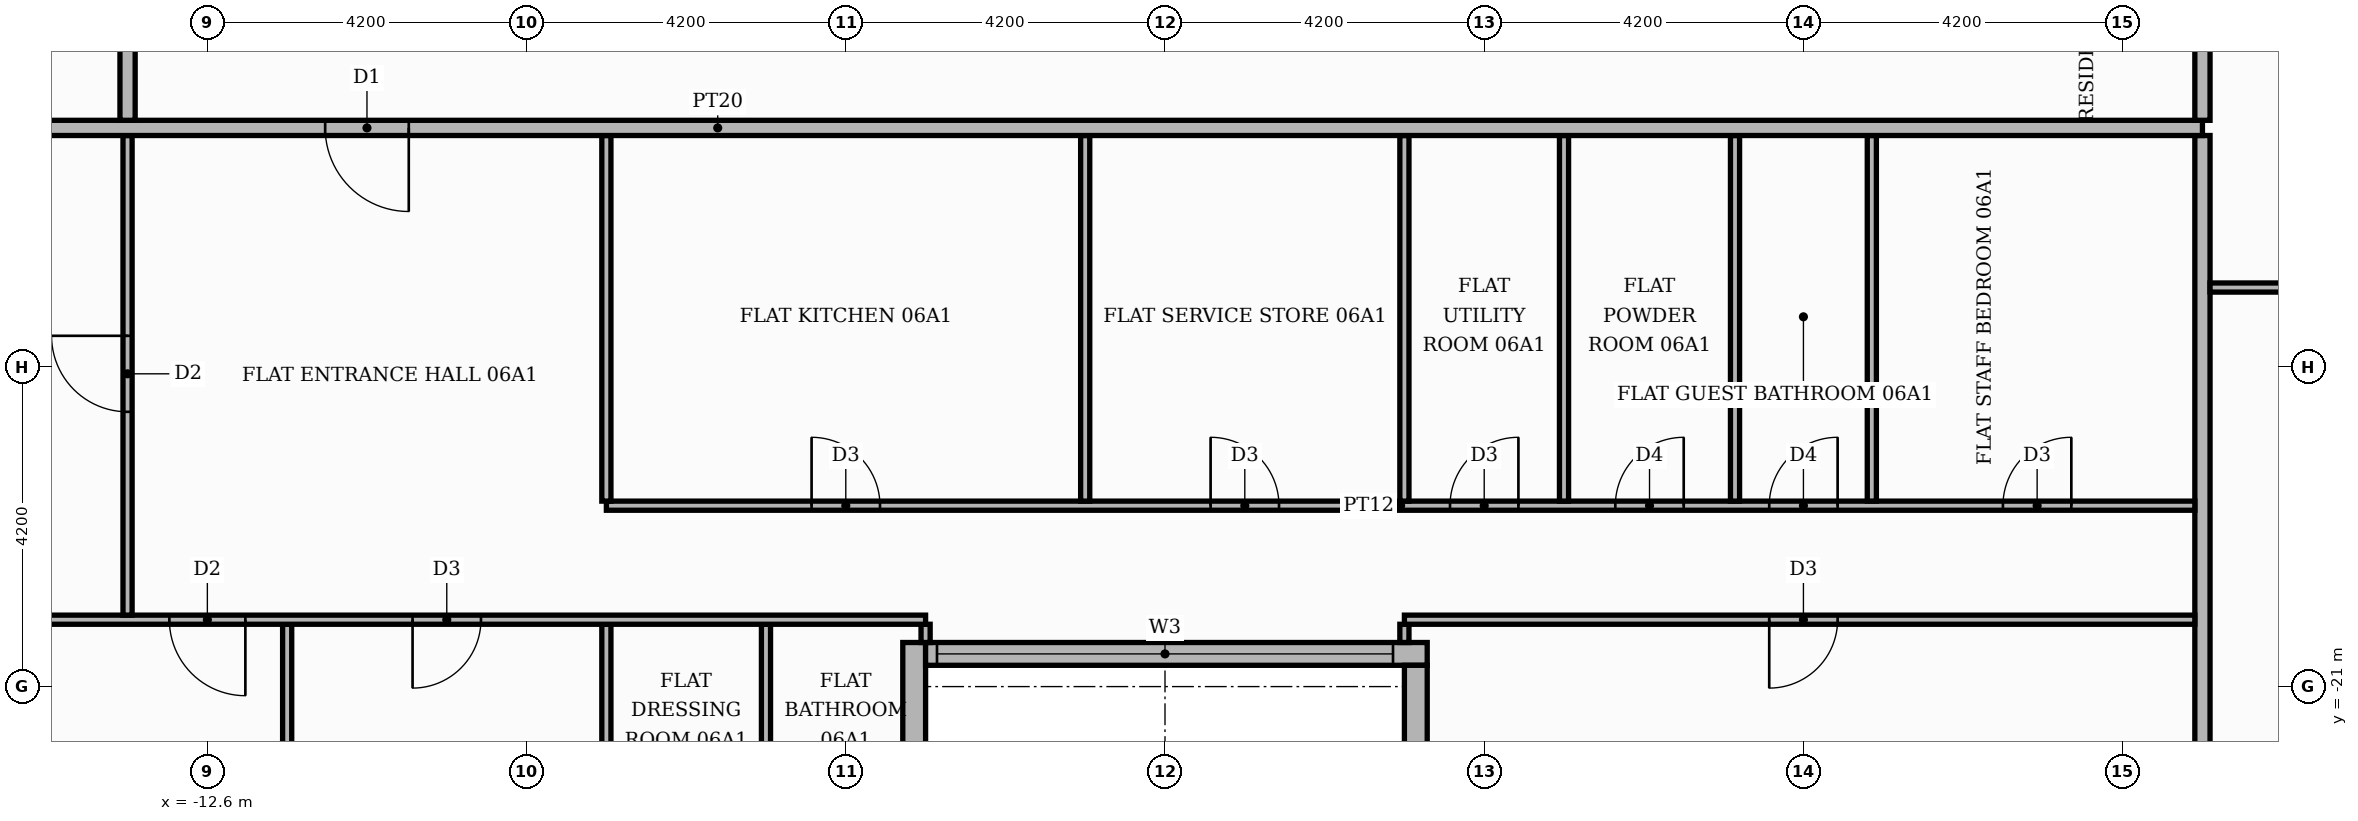
"""IFC4 building model, lengths in metres.
Left out: names, types, materials, properties, quantities, classifications, styles, units other than length and angle.
Written with IfcOpenShell. Run it as: python <this file> out.ifc"""

import sys

from ifc_helpers import new_model, si_unit, direction, frame, frame_2d, origin, place, context, subcontext, project, spatial, rectangle, extrude, element, fill, save


model = new_model("IFC4")
c1 = context("Model", 3, precision=1e-05, world=origin(), true_north=direction((0.0, 1.0)))
c2 = subcontext(c1, "Body", "Model", "MODEL_VIEW")
j1 = project(units=[si_unit("LENGTHUNIT", "METRE"), si_unit("PLANEANGLEUNIT", "RADIAN")], contexts=[c1])
p1 = place(None, origin())
s1 = spatial("IfcSite", under=j1, at=p1, CompositionType="ELEMENT")
p2 = place(p1, origin())
s2 = spatial("IfcBuilding", under=s1, at=p2, CompositionType="ELEMENT")
p3 = place(p2, frame((0.0, 0.0, 30.9)))
s3 = spatial("IfcBuildingStorey", under=s2, at=p3, CompositionType="ELEMENT", Elevation=30.9)
p4 = place(p3, frame((-3.3, -25.42, 0.0), z_axis=(0.0, 0.0, 1.0), x_axis=(0.0, 1.0, 0.0)))
e1 = element("IfcWall", 1, at=p4, inside=s3, PredefinedType="STANDARD", context=c2, shape_type="SweptSolid", body=[
    extrude(rectangle(XDim=5.0, YDim=0.3, at=frame_2d((2.5, 0.0))), origin(), (0.0, 0.0, 1.0), 3.48),
])
p5 = place(p4, frame((1.42, 0.0, 0.9)))
e2 = element("IfcOpeningElement", 2, at=p5, cuts=e1, PredefinedType="OPENING", context=c2, shape_type="SweptSolid", body=[
    extrude(rectangle(XDim=1.8, YDim=2.1, at=frame_2d((0.9, 1.05))), frame((0.0, 0.16, 0.0), z_axis=(0.0, -1.0, 0.0), x_axis=(1.0, 0.0, 0.0)), (0.0, 0.0, 1.0), 0.32),
])
p6 = place(p3, frame((-3.15, -20.57, 0.0), z_axis=(0.0, 0.0, 1.0), x_axis=(1.0, 0.0, 0.0)))
e3 = element("IfcWall", 3, at=p6, inside=s3, PredefinedType="STANDARD", context=c2, shape_type="SweptSolid", body=[
    extrude(rectangle(XDim=6.6, YDim=0.3, at=frame_2d((3.3, 0.0))), origin(), (0.0, 0.0, 1.0), 3.48),
])
p7 = place(p6, frame((0.15, 0.0, 0.9)))
e4 = element("IfcOpeningElement", 4, at=p7, cuts=e3, PredefinedType="OPENING", context=c2, shape_type="SweptSolid", body=[
    extrude(rectangle(XDim=6.0, YDim=2.1, at=frame_2d((3.0, 1.05))), frame((0.0, 0.16, 0.0), z_axis=(0.0, -1.0, 0.0), x_axis=(1.0, 0.0, 0.0)), (0.0, 0.0, 1.0), 0.32),
])
p8 = place(p3, frame((3.3, -20.72, 0.0), z_axis=(0.0, 0.0, 1.0), x_axis=(0.0, -1.0, 0.0)))
e5 = element("IfcWall", 5, at=p8, inside=s3, PredefinedType="STANDARD", context=c2, shape_type="SweptSolid", body=[
    extrude(rectangle(XDim=5.0, YDim=0.3, at=frame_2d((2.5, 0.0))), origin(), (0.0, 0.0, 1.0), 3.48),
])
p9 = place(p8, frame((1.48, 0.0, 0.9)))
e6 = element("IfcOpeningElement", 6, at=p9, cuts=e5, PredefinedType="OPENING", context=c2, shape_type="SweptSolid", body=[
    extrude(rectangle(XDim=1.8, YDim=2.1, at=frame_2d((0.9, 1.05))), frame((0.0, 0.16, 0.0), z_axis=(0.0, -1.0, 0.0), x_axis=(1.0, 0.0, 0.0)), (0.0, 0.0, 1.0), 0.32),
])
p10 = place(p3, frame((-11.55, -25.42, 0.0), z_axis=(0.0, 0.0, 1.0), x_axis=(0.0, 1.0, 0.0)))
e7 = element("IfcWall", 7, at=p10, inside=s3, PredefinedType="PARTITIONING", context=c2, shape_type="SweptSolid", body=[
    extrude(rectangle(XDim=5.24, YDim=0.12, at=frame_2d((2.62, 0.0))), origin(), (0.0, 0.0, 1.0), 3.48),
])
p11 = place(p3, frame((-7.35, -25.42, 0.0), z_axis=(0.0, 0.0, 1.0), x_axis=(0.0, 1.0, 0.0)))
e8 = element("IfcWall", 8, at=p11, inside=s3, PredefinedType="PARTITIONING", context=c2, shape_type="SweptSolid", body=[
    extrude(rectangle(XDim=5.24, YDim=0.12, at=frame_2d((2.62, 0.0))), origin(), (0.0, 0.0, 1.0), 3.48),
])
p12 = place(p11, frame((2.05, 0.0, 0.0)))
e9 = element("IfcOpeningElement", 9, at=p12, cuts=e8, PredefinedType="OPENING", context=c2, shape_type="SweptSolid", body=[
    extrude(rectangle(XDim=0.9, YDim=2.1, at=frame_2d((0.45, 1.05))), frame((0.0, 0.07, 0.0), z_axis=(0.0, -1.0, 0.0), x_axis=(1.0, 0.0, 0.0)), (0.0, 0.0, 1.0), 0.14),
])
p13 = place(p3, frame((-5.25, -25.42, 0.0), z_axis=(0.0, 0.0, 1.0), x_axis=(0.0, 1.0, 0.0)))
e10 = element("IfcWall", 10, at=p13, inside=s3, PredefinedType="PARTITIONING", context=c2, shape_type="SweptSolid", body=[
    extrude(rectangle(XDim=5.24, YDim=0.12, at=frame_2d((2.62, 0.0))), origin(), (0.0, 0.0, 1.0), 3.48),
])
p14 = place(p13, frame((2.05, 0.0, 0.0)))
e11 = element("IfcOpeningElement", 11, at=p14, cuts=e10, PredefinedType="OPENING", context=c2, shape_type="SweptSolid", body=[
    extrude(rectangle(XDim=0.9, YDim=2.1, at=frame_2d((0.45, 1.05))), frame((0.0, 0.07, 0.0), z_axis=(0.0, -1.0, 0.0), x_axis=(1.0, 0.0, 0.0)), (0.0, 0.0, 1.0), 0.14),
])
p15 = place(p3, frame((13.65, -25.42, 0.0), z_axis=(0.0, 0.0, 1.0), x_axis=(0.0, 1.0, 0.0)))
e12 = element("IfcWall", 12, at=p15, inside=s3, PredefinedType="PARTITIONING", context=c2, shape_type="SweptSolid", body=[
    extrude(rectangle(XDim=11.67, YDim=0.2, at=frame_2d((5.835, 0.0))), origin(), (0.0, 0.0, 1.0), 3.48),
])
for number, where, z_axis, x_axis in (
    (13, (-3.15, -20.42, 0.0), (0.0, 0.0, 1.0), (0.0, 1.0, 0.0)),
    (14, (3.15, -20.42, 0.0), (0.0, 0.0, 1.0), (0.0, 1.0, 0.0)),
):
    element("IfcWall", number, at=place(p3, frame(where, z_axis=z_axis, x_axis=x_axis)), inside=s3, PredefinedType="PARTITIONING", context=c2, shape_type="SweptSolid", body=[
        extrude(rectangle(XDim=0.24, YDim=0.12, at=frame_2d((0.12, 0.0))), origin(), (0.0, 0.0, 1.0), 3.48),
    ])
p16 = place(p3, frame((-17.3, -20.12, 0.0), z_axis=(0.0, 0.0, 1.0), x_axis=(1.0, 0.0, 0.0)))
e15 = element("IfcWall", 15, at=p16, inside=s3, PredefinedType="PARTITIONING", context=c2, shape_type="SweptSolid", body=[
    extrude(rectangle(XDim=14.15, YDim=0.12, at=frame_2d((7.075, 0.0))), origin(), (0.0, 0.0, 1.0), 3.48),
])
p17 = place(p16, frame((4.2, 0.0, 0.0)))
e16 = element("IfcOpeningElement", 16, at=p17, cuts=e15, PredefinedType="OPENING", context=c2, shape_type="SweptSolid", body=[
    extrude(rectangle(XDim=1.0, YDim=2.1, at=frame_2d((0.5, 1.05))), frame((0.0, 0.07, 0.0), z_axis=(0.0, -1.0, 0.0), x_axis=(1.0, 0.0, 0.0)), (0.0, 0.0, 1.0), 0.14),
])
p18 = place(p16, frame((7.4, 0.0, 0.0)))
e17 = element("IfcOpeningElement", 17, at=p18, cuts=e15, PredefinedType="OPENING", context=c2, shape_type="SweptSolid", body=[
    extrude(rectangle(XDim=0.9, YDim=2.1, at=frame_2d((0.45, 1.05))), frame((0.0, 0.07, 0.0), z_axis=(0.0, -1.0, 0.0), x_axis=(1.0, 0.0, 0.0)), (0.0, 0.0, 1.0), 0.14),
])
p19 = place(p3, frame((3.15, -20.12, 0.0), z_axis=(0.0, 0.0, 1.0), x_axis=(1.0, 0.0, 0.0)))
e18 = element("IfcWall", 18, at=p19, inside=s3, PredefinedType="PARTITIONING", context=c2, shape_type="SweptSolid", body=[
    extrude(rectangle(XDim=10.4, YDim=0.12, at=frame_2d((5.2, 0.0))), origin(), (0.0, 0.0, 1.0), 3.48),
])
p20 = place(p19, frame((4.8, 0.0, 0.0)))
e19 = element("IfcOpeningElement", 19, at=p20, cuts=e18, PredefinedType="OPENING", context=c2, shape_type="SweptSolid", body=[
    extrude(rectangle(XDim=0.9, YDim=2.1, at=frame_2d((0.45, 1.05))), frame((0.0, 0.07, 0.0), z_axis=(0.0, -1.0, 0.0), x_axis=(1.0, 0.0, 0.0)), (0.0, 0.0, 1.0), 0.14),
])
p21 = place(p3, frame((-13.65, -20.06, 0.0), z_axis=(0.0, 0.0, 1.0), x_axis=(0.0, 1.0, 0.0)))
e20 = element("IfcWall", 20, at=p21, inside=s3, PredefinedType="PARTITIONING", context=c2, shape_type="SweptSolid", body=[
    extrude(rectangle(XDim=6.31, YDim=0.12, at=frame_2d((3.155, 0.0))), origin(), (0.0, 0.0, 1.0), 3.48),
])
p22 = place(p21, frame((2.675, 0.0, 0.0)))
e21 = element("IfcOpeningElement", 21, at=p22, cuts=e20, PredefinedType="OPENING", context=c2, shape_type="SweptSolid", body=[
    extrude(rectangle(XDim=1.0, YDim=2.1, at=frame_2d((0.5, 1.05))), frame((0.0, 0.07, 0.0), z_axis=(0.0, -1.0, 0.0), x_axis=(1.0, 0.0, 0.0)), (0.0, 0.0, 1.0), 0.14),
])
p23 = place(p3, frame((-7.35, -18.62, 0.0), z_axis=(0.0, 0.0, 1.0), x_axis=(1.0, 0.0, 0.0)))
e22 = element("IfcWall", 22, at=p23, inside=s3, PredefinedType="PARTITIONING", context=c2, shape_type="SweptSolid", body=[
    extrude(rectangle(XDim=20.9, YDim=0.12, at=frame_2d((10.45, 0.0))), origin(), (0.0, 0.0, 1.0), 3.48),
])
p24 = place(p23, frame((2.7, 0.0, 0.0)))
e23 = element("IfcOpeningElement", 23, at=p24, cuts=e22, PredefinedType="OPENING", context=c2, shape_type="SweptSolid", body=[
    extrude(rectangle(XDim=0.9, YDim=2.1, at=frame_2d((0.45, 1.05))), frame((0.0, 0.07, 0.0), z_axis=(0.0, -1.0, 0.0), x_axis=(1.0, 0.0, 0.0)), (0.0, 0.0, 1.0), 0.14),
])
p25 = place(p23, frame((7.95, 0.0, 0.0)))
e24 = element("IfcOpeningElement", 24, at=p25, cuts=e22, PredefinedType="OPENING", context=c2, shape_type="SweptSolid", body=[
    extrude(rectangle(XDim=0.9, YDim=2.1, at=frame_2d((0.45, 1.05))), frame((0.0, 0.07, 0.0), z_axis=(0.0, -1.0, 0.0), x_axis=(1.0, 0.0, 0.0)), (0.0, 0.0, 1.0), 0.14),
])
p26 = place(p23, frame((11.1, 0.0, 0.0)))
e25 = element("IfcOpeningElement", 25, at=p26, cuts=e22, PredefinedType="OPENING", context=c2, shape_type="SweptSolid", body=[
    extrude(rectangle(XDim=0.9, YDim=2.1, at=frame_2d((0.45, 1.05))), frame((0.0, 0.07, 0.0), z_axis=(0.0, -1.0, 0.0), x_axis=(1.0, 0.0, 0.0)), (0.0, 0.0, 1.0), 0.14),
])
p27 = place(p23, frame((13.275, 0.0, 0.0)))
e26 = element("IfcOpeningElement", 26, at=p27, cuts=e22, PredefinedType="OPENING", context=c2, shape_type="SweptSolid", body=[
    extrude(rectangle(XDim=0.9, YDim=2.1, at=frame_2d((0.45, 1.05))), frame((0.0, 0.07, 0.0), z_axis=(0.0, -1.0, 0.0), x_axis=(1.0, 0.0, 0.0)), (0.0, 0.0, 1.0), 0.14),
])
p28 = place(p23, frame((15.3, 0.0, 0.0)))
e27 = element("IfcOpeningElement", 27, at=p28, cuts=e22, PredefinedType="OPENING", context=c2, shape_type="SweptSolid", body=[
    extrude(rectangle(XDim=0.9, YDim=2.1, at=frame_2d((0.45, 1.05))), frame((0.0, 0.07, 0.0), z_axis=(0.0, -1.0, 0.0), x_axis=(1.0, 0.0, 0.0)), (0.0, 0.0, 1.0), 0.14),
])
p29 = place(p23, frame((18.375, 0.0, 0.0)))
e28 = element("IfcOpeningElement", 28, at=p29, cuts=e22, PredefinedType="OPENING", context=c2, shape_type="SweptSolid", body=[
    extrude(rectangle(XDim=0.9, YDim=2.1, at=frame_2d((0.45, 1.05))), frame((0.0, 0.07, 0.0), z_axis=(0.0, -1.0, 0.0), x_axis=(1.0, 0.0, 0.0)), (0.0, 0.0, 1.0), 0.14),
])
for number, where, z_axis, x_axis in (
    (29, (-7.35, -18.56, 0.0), (0.0, 0.0, 1.0), (0.0, 1.0, 0.0)),
    (30, (-1.05, -18.56, 0.0), (0.0, 0.0, 1.0), (0.0, 1.0, 0.0)),
    (31, (3.15, -18.56, 0.0), (0.0, 0.0, 1.0), (0.0, 1.0, 0.0)),
    (32, (5.25, -18.56, 0.0), (0.0, 0.0, 1.0), (0.0, 1.0, 0.0)),
    (33, (7.5, -18.56, 0.0), (0.0, 0.0, 1.0), (0.0, 1.0, 0.0)),
    (34, (9.3, -18.56, 0.0), (0.0, 0.0, 1.0), (0.0, 1.0, 0.0)),
):
    element("IfcWall", number, at=place(p3, frame(where, z_axis=z_axis, x_axis=x_axis)), inside=s3, PredefinedType="PARTITIONING", context=c2, shape_type="SweptSolid", body=[
        extrude(rectangle(XDim=4.81, YDim=0.12, at=frame_2d((2.405, 0.0))), origin(), (0.0, 0.0, 1.0), 3.48),
    ])
p30 = place(p3, frame((13.75, -15.75, 0.0), z_axis=(0.0, 0.0, 1.0), x_axis=(1.0, 0.0, 0.0)))
e35 = element("IfcWall", 35, at=p30, inside=s3, PredefinedType="PARTITIONING", context=c2, shape_type="SweptSolid", body=[
    extrude(rectangle(XDim=6.37, YDim=0.12, at=frame_2d((3.185, 0.0))), origin(), (0.0, 0.0, 1.0), 3.48),
])
p31 = place(p30, frame((2.635, 0.0, 0.0)))
e36 = element("IfcOpeningElement", 36, at=p31, cuts=e35, PredefinedType="OPENING", context=c2, shape_type="SweptSolid", body=[
    extrude(rectangle(XDim=1.0, YDim=2.1, at=frame_2d((0.5, 1.05))), frame((0.0, 0.07, 0.0), z_axis=(0.0, -1.0, 0.0), x_axis=(1.0, 0.0, 0.0)), (0.0, 0.0, 1.0), 0.14),
])
p32 = place(p3, frame((-25.42, -13.65, 0.0), z_axis=(0.0, 0.0, 1.0), x_axis=(1.0, 0.0, 0.0)))
e37 = element("IfcWall", 37, at=p32, inside=s3, PredefinedType="PARTITIONING", context=c2, shape_type="SweptSolid", body=[
    extrude(rectangle(XDim=39.07, YDim=0.2, at=frame_2d((19.535, 0.0))), origin(), (0.0, 0.0, 1.0), 3.48),
])
p33 = place(p32, frame((14.37, 0.0, 0.0)))
e38 = element("IfcOpeningElement", 38, at=p33, cuts=e37, PredefinedType="OPENING", context=c2, shape_type="SweptSolid", body=[
    extrude(rectangle(XDim=1.1, YDim=2.4, at=frame_2d((0.55, 1.2))), frame((0.0, 0.11, 0.0), z_axis=(0.0, -1.0, 0.0), x_axis=(1.0, 0.0, 0.0)), (0.0, 0.0, 1.0), 0.22),
])
p34 = place(p3, frame((-13.65, -13.55, 0.0), z_axis=(0.0, 0.0, 1.0), x_axis=(0.0, 1.0, 0.0)))
e39 = element("IfcWall", 39, at=p34, inside=s3, PredefinedType="PARTITIONING", context=c2, shape_type="SweptSolid", body=[
    extrude(rectangle(XDim=27.1, YDim=0.2, at=frame_2d((13.55, 0.0))), origin(), (0.0, 0.0, 1.0), 3.48),
])
p35 = place(p34, frame((24.55, 0.0, 0.0)))
e40 = element("IfcOpeningElement", 40, at=p35, cuts=e39, PredefinedType="OPENING", context=c2, shape_type="SweptSolid", body=[
    extrude(rectangle(XDim=1.1, YDim=2.4, at=frame_2d((0.55, 1.2))), frame((0.0, 0.11, 0.0), z_axis=(0.0, -1.0, 0.0), x_axis=(1.0, 0.0, 0.0)), (0.0, 0.0, 1.0), 0.22),
])
p36 = place(p3, frame((13.65, -13.55, 0.0), z_axis=(0.0, 0.0, 1.0), x_axis=(0.0, 1.0, 0.0)))
e41 = element("IfcWall", 41, at=p36, inside=s3, PredefinedType="PARTITIONING", context=c2, shape_type="SweptSolid", body=[
    extrude(rectangle(XDim=8.2, YDim=0.2, at=frame_2d((4.1, 0.0))), origin(), (0.0, 0.0, 1.0), 3.48),
])
p37 = place(p36, frame((1.45, 0.0, 0.0)))
e42 = element("IfcOpeningElement", 42, at=p37, cuts=e41, PredefinedType="OPENING", context=c2, shape_type="SweptSolid", body=[
    extrude(rectangle(XDim=1.1, YDim=2.4, at=frame_2d((0.55, 1.2))), frame((0.0, 0.11, 0.0), z_axis=(0.0, -1.0, 0.0), x_axis=(1.0, 0.0, 0.0)), (0.0, 0.0, 1.0), 0.22),
])
p38 = place(p7, origin())
e43 = element("IfcWindow", 43, at=p38, inside=s3, PartitioningType="SINGLE_PANEL", PredefinedType="WINDOW", context=c2, shape_type="SweptSolid", body=[
    extrude(rectangle(XDim=6.0, YDim=2.1, at=frame_2d((3.0, 1.05))), frame((0.0, 0.03, 0.0), z_axis=(0.0, -1.0, 0.0), x_axis=(1.0, 0.0, 0.0)), (0.0, 0.0, 1.0), 0.06),
])
fill(e4, e43)
p39 = place(p33, frame((1.1, 0.0, 0.0), z_axis=(0.0, 0.0, 1.0), x_axis=(-1.0, 0.0, 0.0)))
e44 = element("IfcDoor", 44, at=p39, inside=s3, OperationType="SINGLE_SWING_RIGHT", PredefinedType="DOOR", context=c2, shape_type="SweptSolid", body=[
    extrude(rectangle(XDim=1.1, YDim=2.4, at=frame_2d((0.55, 1.2))), frame((0.0, 0.025, 0.0), z_axis=(0.0, -1.0, 0.0), x_axis=(1.0, 0.0, 0.0)), (0.0, 0.0, 1.0), 0.05),
])
fill(e38, e44)
p40 = place(p22, origin())
e45 = element("IfcDoor", 45, at=p40, inside=s3, OperationType="SINGLE_SWING_RIGHT", PredefinedType="DOOR", context=c2, shape_type="SweptSolid", body=[
    extrude(rectangle(XDim=1.0, YDim=2.1, at=frame_2d((0.5, 1.05))), frame((0.0, 0.025, 0.0), z_axis=(0.0, -1.0, 0.0), x_axis=(1.0, 0.0, 0.0)), (0.0, 0.0, 1.0), 0.05),
])
fill(e21, e45)
p41 = place(p24, origin())
e46 = element("IfcDoor", 46, at=p41, inside=s3, OperationType="SINGLE_SWING_LEFT", PredefinedType="DOOR", context=c2, shape_type="SweptSolid", body=[
    extrude(rectangle(XDim=0.9, YDim=2.1, at=frame_2d((0.45, 1.05))), frame((0.0, 0.025, 0.0), z_axis=(0.0, -1.0, 0.0), x_axis=(1.0, 0.0, 0.0)), (0.0, 0.0, 1.0), 0.05),
])
fill(e23, e46)
p42 = place(p25, origin())
e47 = element("IfcDoor", 47, at=p42, inside=s3, OperationType="SINGLE_SWING_LEFT", PredefinedType="DOOR", context=c2, shape_type="SweptSolid", body=[
    extrude(rectangle(XDim=0.9, YDim=2.1, at=frame_2d((0.45, 1.05))), frame((0.0, 0.025, 0.0), z_axis=(0.0, -1.0, 0.0), x_axis=(1.0, 0.0, 0.0)), (0.0, 0.0, 1.0), 0.05),
])
fill(e24, e47)
p43 = place(p26, origin())
e48 = element("IfcDoor", 48, at=p43, inside=s3, OperationType="SINGLE_SWING_RIGHT", PredefinedType="DOOR", context=c2, shape_type="SweptSolid", body=[
    extrude(rectangle(XDim=0.9, YDim=2.1, at=frame_2d((0.45, 1.05))), frame((0.0, 0.025, 0.0), z_axis=(0.0, -1.0, 0.0), x_axis=(1.0, 0.0, 0.0)), (0.0, 0.0, 1.0), 0.05),
])
fill(e25, e48)
p44 = place(p27, origin())
e49 = element("IfcDoor", 49, at=p44, inside=s3, OperationType="SINGLE_SWING_RIGHT", PredefinedType="DOOR", context=c2, shape_type="SweptSolid", body=[
    extrude(rectangle(XDim=0.9, YDim=2.1, at=frame_2d((0.45, 1.05))), frame((0.0, 0.025, 0.0), z_axis=(0.0, -1.0, 0.0), x_axis=(1.0, 0.0, 0.0)), (0.0, 0.0, 1.0), 0.05),
])
fill(e26, e49)
p45 = place(p28, origin())
e50 = element("IfcDoor", 50, at=p45, inside=s3, OperationType="SINGLE_SWING_RIGHT", PredefinedType="DOOR", context=c2, shape_type="SweptSolid", body=[
    extrude(rectangle(XDim=0.9, YDim=2.1, at=frame_2d((0.45, 1.05))), frame((0.0, 0.025, 0.0), z_axis=(0.0, -1.0, 0.0), x_axis=(1.0, 0.0, 0.0)), (0.0, 0.0, 1.0), 0.05),
])
fill(e27, e50)
p46 = place(p29, origin())
e51 = element("IfcDoor", 51, at=p46, inside=s3, OperationType="SINGLE_SWING_RIGHT", PredefinedType="DOOR", context=c2, shape_type="SweptSolid", body=[
    extrude(rectangle(XDim=0.9, YDim=2.1, at=frame_2d((0.45, 1.05))), frame((0.0, 0.025, 0.0), z_axis=(0.0, -1.0, 0.0), x_axis=(1.0, 0.0, 0.0)), (0.0, 0.0, 1.0), 0.05),
])
fill(e28, e51)
p47 = place(p17, frame((1.0, 0.0, 0.0), z_axis=(0.0, 0.0, 1.0), x_axis=(-1.0, 0.0, 0.0)))
e52 = element("IfcDoor", 52, at=p47, inside=s3, OperationType="SINGLE_SWING_RIGHT", PredefinedType="DOOR", context=c2, shape_type="SweptSolid", body=[
    extrude(rectangle(XDim=1.0, YDim=2.1, at=frame_2d((0.5, 1.05))), frame((0.0, 0.025, 0.0), z_axis=(0.0, -1.0, 0.0), x_axis=(1.0, 0.0, 0.0)), (0.0, 0.0, 1.0), 0.05),
])
fill(e16, e52)
p48 = place(p18, frame((0.9, 0.0, 0.0), z_axis=(0.0, 0.0, 1.0), x_axis=(-1.0, 0.0, 0.0)))
e53 = element("IfcDoor", 53, at=p48, inside=s3, OperationType="SINGLE_SWING_LEFT", PredefinedType="DOOR", context=c2, shape_type="SweptSolid", body=[
    extrude(rectangle(XDim=0.9, YDim=2.1, at=frame_2d((0.45, 1.05))), frame((0.0, 0.025, 0.0), z_axis=(0.0, -1.0, 0.0), x_axis=(1.0, 0.0, 0.0)), (0.0, 0.0, 1.0), 0.05),
])
fill(e17, e53)
p49 = place(p20, frame((0.9, 0.0, 0.0), z_axis=(0.0, 0.0, 1.0), x_axis=(-1.0, 0.0, 0.0)))
e54 = element("IfcDoor", 54, at=p49, inside=s3, OperationType="SINGLE_SWING_LEFT", PredefinedType="DOOR", context=c2, shape_type="SweptSolid", body=[
    extrude(rectangle(XDim=0.9, YDim=2.1, at=frame_2d((0.45, 1.05))), frame((0.0, 0.025, 0.0), z_axis=(0.0, -1.0, 0.0), x_axis=(1.0, 0.0, 0.0)), (0.0, 0.0, 1.0), 0.05),
])
fill(e19, e54)
save(model, sys.argv[1])
